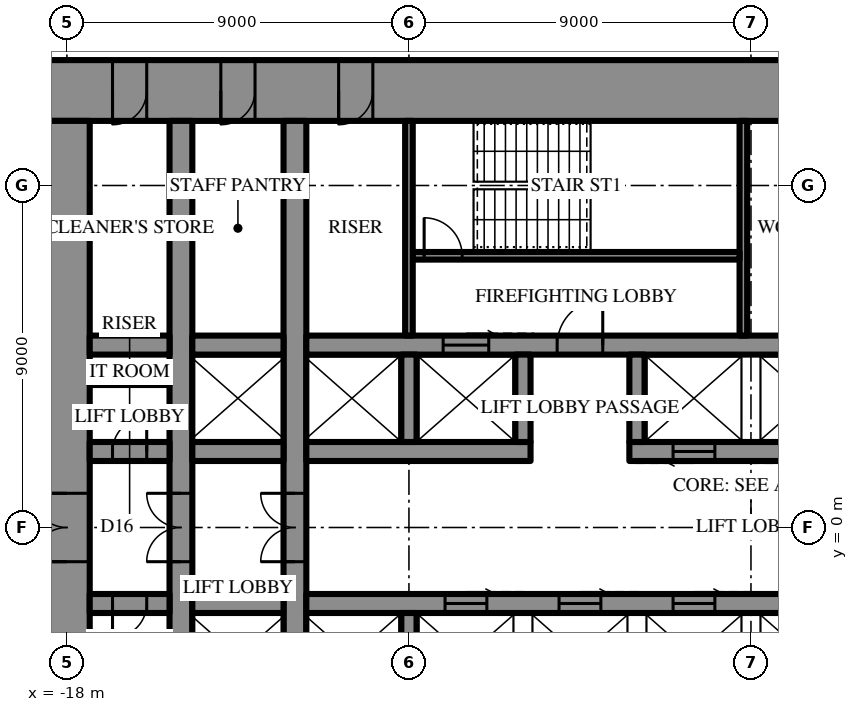
"""IFC4 building model, lengths in metres.
Left out: names, types, materials, properties, quantities, classifications, styles, units other than length and angle.
Written with IfcOpenShell. Run it as: python <this file> out.ifc"""

import sys

from ifc_helpers import new_model, si_unit, direction, frame, frame_2d, origin, place, context, subcontext, project, spatial, rectangle, extrude, element, fill, save


model = new_model("IFC4")
c1 = context("Model", 3, precision=1e-05, world=origin(), true_north=direction((0.0, 1.0)))
c2 = subcontext(c1, "Body", "Model", "MODEL_VIEW")
j1 = project(units=[si_unit("LENGTHUNIT", "METRE"), si_unit("PLANEANGLEUNIT", "RADIAN")], contexts=[c1])
p1 = place(None, origin())
s1 = spatial("IfcSite", under=j1, at=p1, CompositionType="ELEMENT")
p2 = place(p1, origin())
s2 = spatial("IfcBuilding", under=s1, at=p2, CompositionType="ELEMENT")
p3 = place(p2, frame((0.0, 0.0, 174.1)))
s3 = spatial("IfcBuildingStorey", under=s2, at=p3, CompositionType="ELEMENT", Elevation=174.1)
p4 = place(p3, frame((-18.6, 11.5, 0.0), z_axis=(0.0, 0.0, 1.0), x_axis=(1.0, 0.0, 0.0)))
e1 = element("IfcWall", 1, at=p4, inside=s3, PredefinedType="SHEAR", context=c2, shape_type="SweptSolid", body=[
    extrude(rectangle(XDim=37.2, YDim=1.6, at=frame_2d((18.6, 0.0))), origin(), (0.0, 0.0, 1.0), 4.2),
])
p5 = place(p4, frame((19.45, 0.0, 0.0)))
e2 = element("IfcOpeningElement", 2, at=p5, cuts=e1, PredefinedType="OPENING", context=c2, shape_type="SweptSolid", body=[
    extrude(rectangle(XDim=0.9, YDim=2.2, at=frame_2d((0.45, 1.1))), frame((0.0, 0.81, 0.0), z_axis=(0.0, -1.0, 0.0), x_axis=(1.0, 0.0, 0.0)), (0.0, 0.0, 1.0), 1.62),
])
p6 = place(p4, frame((22.45, 0.0, 0.0)))
e3 = element("IfcOpeningElement", 3, at=p6, cuts=e1, PredefinedType="OPENING", context=c2, shape_type="SweptSolid", body=[
    extrude(rectangle(XDim=0.9, YDim=2.2, at=frame_2d((0.45, 1.1))), frame((0.0, 0.81, 0.0), z_axis=(0.0, -1.0, 0.0), x_axis=(1.0, 0.0, 0.0)), (0.0, 0.0, 1.0), 1.62),
])
p7 = place(p4, frame((25.5, 0.0, 0.0)))
e4 = element("IfcOpeningElement", 4, at=p7, cuts=e1, PredefinedType="OPENING", context=c2, shape_type="SweptSolid", body=[
    extrude(rectangle(XDim=1.0, YDim=2.2, at=frame_2d((0.5, 1.1))), frame((0.0, 0.81, 0.0), z_axis=(0.0, -1.0, 0.0), x_axis=(1.0, 0.0, 0.0)), (0.0, 0.0, 1.0), 1.62),
])
p8 = place(p4, frame((1.8, 0.0, 0.0)))
e5 = element("IfcOpeningElement", 5, at=p8, cuts=e1, PredefinedType="OPENING", context=c2, shape_type="SweptSolid", body=[
    extrude(rectangle(XDim=0.9, YDim=2.2, at=frame_2d((0.45, 1.1))), frame((0.0, 0.81, 0.0), z_axis=(0.0, -1.0, 0.0), x_axis=(1.0, 0.0, 0.0)), (0.0, 0.0, 1.0), 1.62),
])
p9 = place(p4, frame((4.65, 0.0, 0.0)))
e6 = element("IfcOpeningElement", 6, at=p9, cuts=e1, PredefinedType="OPENING", context=c2, shape_type="SweptSolid", body=[
    extrude(rectangle(XDim=0.9, YDim=2.2, at=frame_2d((0.45, 1.1))), frame((0.0, 0.81, 0.0), z_axis=(0.0, -1.0, 0.0), x_axis=(1.0, 0.0, 0.0)), (0.0, 0.0, 1.0), 1.62),
])
p10 = place(p4, frame((7.75, 0.0, 0.0)))
e7 = element("IfcOpeningElement", 7, at=p10, cuts=e1, PredefinedType="OPENING", context=c2, shape_type="SweptSolid", body=[
    extrude(rectangle(XDim=0.9, YDim=2.2, at=frame_2d((0.45, 1.1))), frame((0.0, 0.81, 0.0), z_axis=(0.0, -1.0, 0.0), x_axis=(1.0, 0.0, 0.0)), (0.0, 0.0, 1.0), 1.62),
])
p11 = place(p4, frame((28.55, 0.0, 0.0)))
e8 = element("IfcOpeningElement", 8, at=p11, cuts=e1, PredefinedType="OPENING", context=c2, shape_type="SweptSolid", body=[
    extrude(rectangle(XDim=0.9, YDim=2.2, at=frame_2d((0.45, 1.1))), frame((0.0, 0.81, 0.0), z_axis=(0.0, -1.0, 0.0), x_axis=(1.0, 0.0, 0.0)), (0.0, 0.0, 1.0), 1.62),
])
p12 = place(p4, frame((31.65, 0.0, 0.0)))
e9 = element("IfcOpeningElement", 9, at=p12, cuts=e1, PredefinedType="OPENING", context=c2, shape_type="SweptSolid", body=[
    extrude(rectangle(XDim=0.9, YDim=2.2, at=frame_2d((0.45, 1.1))), frame((0.0, 0.81, 0.0), z_axis=(0.0, -1.0, 0.0), x_axis=(1.0, 0.0, 0.0)), (0.0, 0.0, 1.0), 1.62),
])
p13 = place(p4, frame((34.5, 0.0, 0.0)))
e10 = element("IfcOpeningElement", 10, at=p13, cuts=e1, PredefinedType="OPENING", context=c2, shape_type="SweptSolid", body=[
    extrude(rectangle(XDim=0.9, YDim=2.2, at=frame_2d((0.45, 1.1))), frame((0.0, 0.81, 0.0), z_axis=(0.0, -1.0, 0.0), x_axis=(1.0, 0.0, 0.0)), (0.0, 0.0, 1.0), 1.62),
])
p14 = place(p3, frame((-18.0, 10.7, 0.0), z_axis=(0.0, 0.0, 1.0), x_axis=(0.0, -1.0, 0.0)))
e11 = element("IfcWall", 11, at=p14, inside=s3, PredefinedType="SHEAR", context=c2, shape_type="SweptSolid", body=[
    extrude(rectangle(XDim=21.4, YDim=1.2, at=frame_2d((10.7, 0.0))), origin(), (0.0, 0.0, 1.0), 4.2),
])
p15 = place(p14, frame((9.8, 0.0, 0.0)))
e12 = element("IfcOpeningElement", 12, at=p15, cuts=e11, PredefinedType="OPENING", context=c2, shape_type="SweptSolid", body=[
    extrude(rectangle(XDim=1.8, YDim=2.4, at=frame_2d((0.9, 1.2))), frame((0.0, 0.61, 0.0), z_axis=(0.0, -1.0, 0.0), x_axis=(1.0, 0.0, 0.0)), (0.0, 0.0, 1.0), 1.22),
])
p16 = place(p3, frame((-12.0, -10.7, 0.0), z_axis=(0.0, 0.0, 1.0), x_axis=(0.0, 1.0, 0.0)))
e13 = element("IfcWall", 13, at=p16, inside=s3, PredefinedType="SHEAR", context=c2, shape_type="SweptSolid", body=[
    extrude(rectangle(XDim=21.4, YDim=0.6, at=frame_2d((10.7, 0.0))), origin(), (0.0, 0.0, 1.0), 4.2),
])
p17 = place(p16, frame((9.8, 0.0, 0.0)))
e14 = element("IfcOpeningElement", 14, at=p17, cuts=e13, PredefinedType="OPENING", context=c2, shape_type="SweptSolid", body=[
    extrude(rectangle(XDim=1.8, YDim=2.4, at=frame_2d((0.9, 1.2))), frame((0.0, 0.31, 0.0), z_axis=(0.0, -1.0, 0.0), x_axis=(1.0, 0.0, 0.0)), (0.0, 0.0, 1.0), 0.62),
])
p18 = place(p3, frame((-15.0, -10.7, 0.0), z_axis=(0.0, 0.0, 1.0), x_axis=(0.0, 1.0, 0.0)))
e15 = element("IfcWall", 15, at=p18, inside=s3, PredefinedType="SHEAR", context=c2, shape_type="SweptSolid", body=[
    extrude(rectangle(XDim=21.4, YDim=0.6, at=frame_2d((10.7, 0.0))), origin(), (0.0, 0.0, 1.0), 4.2),
])
p19 = place(p18, frame((9.8, 0.0, 0.0)))
e16 = element("IfcOpeningElement", 16, at=p19, cuts=e15, PredefinedType="OPENING", context=c2, shape_type="SweptSolid", body=[
    extrude(rectangle(XDim=1.8, YDim=2.4, at=frame_2d((0.9, 1.2))), frame((0.0, 0.31, 0.0), z_axis=(0.0, -1.0, 0.0), x_axis=(1.0, 0.0, 0.0)), (0.0, 0.0, 1.0), 0.62),
])
p20 = place(p3, frame((-17.4, 2.0, 0.0), z_axis=(0.0, 0.0, 1.0), x_axis=(1.0, 0.0, 0.0)))
e17 = element("IfcWall", 17, at=p20, inside=s3, PredefinedType="SHEAR", context=c2, shape_type="SweptSolid", body=[
    extrude(rectangle(XDim=2.1, YDim=0.5, at=frame_2d((1.05, 0.0))), origin(), (0.0, 0.0, 1.0), 4.2),
])
p21 = place(p20, frame((0.6, 0.0, 0.0)))
e18 = element("IfcOpeningElement", 18, at=p21, cuts=e17, PredefinedType="OPENING", context=c2, shape_type="SweptSolid", body=[
    extrude(rectangle(XDim=0.9, YDim=2.2, at=frame_2d((0.45, 1.1))), frame((0.0, 0.26, 0.0), z_axis=(0.0, -1.0, 0.0), x_axis=(1.0, 0.0, 0.0)), (0.0, 0.0, 1.0), 0.52),
])
p22 = place(p3, frame((-14.7, 2.0, 0.0), z_axis=(0.0, 0.0, 1.0), x_axis=(1.0, 0.0, 0.0)))
e19 = element("IfcWall", 19, at=p22, inside=s3, PredefinedType="SHEAR", context=c2, shape_type="SweptSolid", body=[
    extrude(rectangle(XDim=2.4, YDim=0.5, at=frame_2d((1.2, 0.0))), origin(), (0.0, 0.0, 1.0), 4.2),
])
p23 = place(p3, frame((-11.7, 2.0, 0.0), z_axis=(0.0, 0.0, 1.0), x_axis=(1.0, 0.0, 0.0)))
e20 = element("IfcWall", 20, at=p23, inside=s3, PredefinedType="SHEAR", context=c2, shape_type="SweptSolid", body=[
    extrude(rectangle(XDim=5.9, YDim=0.5, at=frame_2d((2.95, 0.0))), origin(), (0.0, 0.0, 1.0), 4.2),
])
p24 = place(p3, frame((-3.2, 2.0, 0.0), z_axis=(0.0, 0.0, 1.0), x_axis=(1.0, 0.0, 0.0)))
e21 = element("IfcWall", 21, at=p24, inside=s3, PredefinedType="SHEAR", context=c2, shape_type="SweptSolid", body=[
    extrude(rectangle(XDim=14.9, YDim=0.5, at=frame_2d((7.45, 0.0))), origin(), (0.0, 0.0, 1.0), 4.2),
])
p25 = place(p24, frame((1.15, 0.0, 0.0)))
e22 = element("IfcOpeningElement", 22, at=p25, cuts=e21, PredefinedType="OPENING", context=c2, shape_type="SweptSolid", body=[
    extrude(rectangle(XDim=1.1, YDim=2.2, at=frame_2d((0.55, 1.1))), frame((0.0, 0.26, 0.0), z_axis=(0.0, -1.0, 0.0), x_axis=(1.0, 0.0, 0.0)), (0.0, 0.0, 1.0), 0.52),
])
p26 = place(p24, frame((4.15, 0.0, 0.0)))
e23 = element("IfcOpeningElement", 23, at=p26, cuts=e21, PredefinedType="OPENING", context=c2, shape_type="SweptSolid", body=[
    extrude(rectangle(XDim=1.1, YDim=2.2, at=frame_2d((0.55, 1.1))), frame((0.0, 0.26, 0.0), z_axis=(0.0, -1.0, 0.0), x_axis=(1.0, 0.0, 0.0)), (0.0, 0.0, 1.0), 0.52),
])
p27 = place(p24, frame((7.15, 0.0, 0.0)))
e24 = element("IfcOpeningElement", 24, at=p27, cuts=e21, PredefinedType="OPENING", context=c2, shape_type="SweptSolid", body=[
    extrude(rectangle(XDim=1.1, YDim=2.2, at=frame_2d((0.55, 1.1))), frame((0.0, 0.26, 0.0), z_axis=(0.0, -1.0, 0.0), x_axis=(1.0, 0.0, 0.0)), (0.0, 0.0, 1.0), 0.52),
])
p28 = place(p24, frame((10.15, 0.0, 0.0)))
e25 = element("IfcOpeningElement", 25, at=p28, cuts=e21, PredefinedType="OPENING", context=c2, shape_type="SweptSolid", body=[
    extrude(rectangle(XDim=1.1, YDim=2.2, at=frame_2d((0.55, 1.1))), frame((0.0, 0.26, 0.0), z_axis=(0.0, -1.0, 0.0), x_axis=(1.0, 0.0, 0.0)), (0.0, 0.0, 1.0), 0.52),
])
p29 = place(p3, frame((-17.4, 4.8, 0.0), z_axis=(0.0, 0.0, 1.0), x_axis=(1.0, 0.0, 0.0)))
e26 = element("IfcWall", 26, at=p29, inside=s3, PredefinedType="SHEAR", context=c2, shape_type="SweptSolid", body=[
    extrude(rectangle(XDim=2.1, YDim=0.5, at=frame_2d((1.05, 0.0))), origin(), (0.0, 0.0, 1.0), 4.2),
])
p30 = place(p3, frame((-14.7, 4.8, 0.0), z_axis=(0.0, 0.0, 1.0), x_axis=(1.0, 0.0, 0.0)))
e27 = element("IfcWall", 27, at=p30, inside=s3, PredefinedType="SHEAR", context=c2, shape_type="SweptSolid", body=[
    extrude(rectangle(XDim=2.4, YDim=0.5, at=frame_2d((1.2, 0.0))), origin(), (0.0, 0.0, 1.0), 4.2),
])
p31 = place(p3, frame((-11.7, 4.8, 0.0), z_axis=(0.0, 0.0, 1.0), x_axis=(1.0, 0.0, 0.0)))
e28 = element("IfcWall", 28, at=p31, inside=s3, PredefinedType="SHEAR", context=c2, shape_type="SweptSolid", body=[
    extrude(rectangle(XDim=23.4, YDim=0.5, at=frame_2d((11.7, 0.0))), origin(), (0.0, 0.0, 1.0), 4.2),
])
p32 = place(p31, frame((6.6, 0.0, 0.0)))
e29 = element("IfcOpeningElement", 29, at=p32, cuts=e28, PredefinedType="OPENING", context=c2, shape_type="SweptSolid", body=[
    extrude(rectangle(XDim=1.2, YDim=2.2, at=frame_2d((0.6, 1.1))), frame((0.0, 0.26, 0.0), z_axis=(0.0, -1.0, 0.0), x_axis=(1.0, 0.0, 0.0)), (0.0, 0.0, 1.0), 0.52),
])
p33 = place(p31, frame((3.6, 0.0, 0.0)))
e30 = element("IfcOpeningElement", 30, at=p33, cuts=e28, PredefinedType="OPENING", context=c2, shape_type="SweptSolid", body=[
    extrude(rectangle(XDim=1.2, YDim=2.2, at=frame_2d((0.6, 1.1))), frame((0.0, 0.26, 0.0), z_axis=(0.0, -1.0, 0.0), x_axis=(1.0, 0.0, 0.0)), (0.0, 0.0, 1.0), 0.52),
])
for number, where, z_axis, x_axis in (
    (31, (-9.0, 2.25, 0.0), (0.0, 0.0, 1.0), (0.0, 1.0, 0.0)),
    (32, (-6.0, 2.25, 0.0), (0.0, 0.0, 1.0), (0.0, 1.0, 0.0)),
    (33, (-3.0, 2.25, 0.0), (0.0, 0.0, 1.0), (0.0, 1.0, 0.0)),
):
    element("IfcWall", number, at=place(p3, frame(where, z_axis=z_axis, x_axis=x_axis)), inside=s3, PredefinedType="SHEAR", context=c2, shape_type="SweptSolid", body=[
        extrude(rectangle(XDim=2.3, YDim=0.4, at=frame_2d((1.15, 0.0))), origin(), (0.0, 0.0, 1.0), 4.2),
    ])
p34 = place(p3, frame((-0.2, 5.05, 0.0), z_axis=(0.0, 0.0, 1.0), x_axis=(0.0, 1.0, 0.0)))
e34 = element("IfcWall", 34, at=p34, inside=s3, PredefinedType="SHEAR", context=c2, shape_type="SweptSolid", body=[
    extrude(rectangle(XDim=5.65, YDim=0.2, at=frame_2d((2.825, 0.0))), origin(), (0.0, 0.0, 1.0), 4.2),
])
p35 = place(p3, frame((-8.9, 7.15, 0.0), z_axis=(0.0, 0.0, 1.0), x_axis=(1.0, 0.0, 0.0)))
e35 = element("IfcWall", 35, at=p35, inside=s3, PredefinedType="SHEAR", context=c2, shape_type="SweptSolid", body=[
    extrude(rectangle(XDim=8.6, YDim=0.2, at=frame_2d((4.3, 0.0))), origin(), (0.0, 0.0, 1.0), 4.2),
])
p36 = place(p35, frame((0.3, 0.0, 0.0)))
e36 = element("IfcOpeningElement", 36, at=p36, cuts=e35, PredefinedType="OPENING", context=c2, shape_type="SweptSolid", body=[
    extrude(rectangle(XDim=1.0, YDim=2.2, at=frame_2d((0.5, 1.1))), frame((0.0, 0.11, 0.0), z_axis=(0.0, -1.0, 0.0), x_axis=(1.0, 0.0, 0.0)), (0.0, 0.0, 1.0), 0.22),
])
p37 = place(p3, frame((3.2, -2.0, 0.0), z_axis=(0.0, 0.0, 1.0), x_axis=(-1.0, 0.0, 0.0)))
e37 = element("IfcWall", 37, at=p37, inside=s3, PredefinedType="SHEAR", context=c2, shape_type="SweptSolid", body=[
    extrude(rectangle(XDim=14.9, YDim=0.5, at=frame_2d((7.45, 0.0))), origin(), (0.0, 0.0, 1.0), 4.2),
])
p38 = place(p37, frame((1.15, 0.0, 0.0)))
e38 = element("IfcOpeningElement", 38, at=p38, cuts=e37, PredefinedType="OPENING", context=c2, shape_type="SweptSolid", body=[
    extrude(rectangle(XDim=1.1, YDim=2.2, at=frame_2d((0.55, 1.1))), frame((0.0, 0.26, 0.0), z_axis=(0.0, -1.0, 0.0), x_axis=(1.0, 0.0, 0.0)), (0.0, 0.0, 1.0), 0.52),
])
p39 = place(p37, frame((4.15, 0.0, 0.0)))
e39 = element("IfcOpeningElement", 39, at=p39, cuts=e37, PredefinedType="OPENING", context=c2, shape_type="SweptSolid", body=[
    extrude(rectangle(XDim=1.1, YDim=2.2, at=frame_2d((0.55, 1.1))), frame((0.0, 0.26, 0.0), z_axis=(0.0, -1.0, 0.0), x_axis=(1.0, 0.0, 0.0)), (0.0, 0.0, 1.0), 0.52),
])
p40 = place(p37, frame((7.15, 0.0, 0.0)))
e40 = element("IfcOpeningElement", 40, at=p40, cuts=e37, PredefinedType="OPENING", context=c2, shape_type="SweptSolid", body=[
    extrude(rectangle(XDim=1.1, YDim=2.2, at=frame_2d((0.55, 1.1))), frame((0.0, 0.26, 0.0), z_axis=(0.0, -1.0, 0.0), x_axis=(1.0, 0.0, 0.0)), (0.0, 0.0, 1.0), 0.52),
])
p41 = place(p37, frame((10.15, 0.0, 0.0)))
e41 = element("IfcOpeningElement", 41, at=p41, cuts=e37, PredefinedType="OPENING", context=c2, shape_type="SweptSolid", body=[
    extrude(rectangle(XDim=1.1, YDim=2.2, at=frame_2d((0.55, 1.1))), frame((0.0, 0.26, 0.0), z_axis=(0.0, -1.0, 0.0), x_axis=(1.0, 0.0, 0.0)), (0.0, 0.0, 1.0), 0.52),
])
p42 = place(p3, frame((-12.3, -2.0, 0.0), z_axis=(0.0, 0.0, 1.0), x_axis=(-1.0, 0.0, 0.0)))
e42 = element("IfcWall", 42, at=p42, inside=s3, PredefinedType="SHEAR", context=c2, shape_type="SweptSolid", body=[
    extrude(rectangle(XDim=2.4, YDim=0.5, at=frame_2d((1.2, 0.0))), origin(), (0.0, 0.0, 1.0), 4.2),
])
p43 = place(p3, frame((-15.3, -2.0, 0.0), z_axis=(0.0, 0.0, 1.0), x_axis=(-1.0, 0.0, 0.0)))
e43 = element("IfcWall", 43, at=p43, inside=s3, PredefinedType="SHEAR", context=c2, shape_type="SweptSolid", body=[
    extrude(rectangle(XDim=2.1, YDim=0.5, at=frame_2d((1.05, 0.0))), origin(), (0.0, 0.0, 1.0), 4.2),
])
p44 = place(p43, frame((0.6, 0.0, 0.0)))
e44 = element("IfcOpeningElement", 44, at=p44, cuts=e43, PredefinedType="OPENING", context=c2, shape_type="SweptSolid", body=[
    extrude(rectangle(XDim=0.9, YDim=2.2, at=frame_2d((0.45, 1.1))), frame((0.0, 0.26, 0.0), z_axis=(0.0, -1.0, 0.0), x_axis=(1.0, 0.0, 0.0)), (0.0, 0.0, 1.0), 0.52),
])
p45 = place(p3, frame((-9.0, -2.25, 0.0), z_axis=(0.0, 0.0, 1.0), x_axis=(0.0, -1.0, 0.0)))
e45 = element("IfcWall", 45, at=p45, inside=s3, PredefinedType="SHEAR", context=c2, shape_type="SweptSolid", body=[
    extrude(rectangle(XDim=2.3, YDim=0.4, at=frame_2d((1.15, 0.0))), origin(), (0.0, 0.0, 1.0), 4.2),
])
p46 = place(p3, frame((-9.0, 5.05, 0.0), z_axis=(0.0, 0.0, 1.0), x_axis=(0.0, 1.0, 0.0)))
e46 = element("IfcWall", 46, at=p46, inside=s3, PredefinedType="PARTITIONING", context=c2, shape_type="SweptSolid", body=[
    extrude(rectangle(XDim=5.65, YDim=0.2, at=frame_2d((2.825, 0.0))), origin(), (0.0, 0.0, 1.0), 4.0),
])
p47 = place(p3, frame((-17.4, 3.85, 0.0), z_axis=(0.0, 0.0, 1.0), x_axis=(1.0, 0.0, 0.0)))
e47 = element("IfcWall", 47, at=p47, inside=s3, PredefinedType="PARTITIONING", context=c2, shape_type="SweptSolid", body=[
    extrude(rectangle(XDim=2.1, YDim=0.2, at=frame_2d((1.05, 0.0))), origin(), (0.0, 0.0, 1.0), 4.0),
])
p48 = place(p15, frame((1.8, 0.0, 0.0), z_axis=(0.0, 0.0, 1.0), x_axis=(-1.0, 0.0, 0.0)))
e48 = element("IfcDoor", 48, at=p48, inside=s3, OperationType="DOUBLE_DOOR_SINGLE_SWING", PredefinedType="DOOR", context=c2, shape_type="SweptSolid", body=[
    extrude(rectangle(XDim=1.8, YDim=2.4, at=frame_2d((0.9, 1.2))), frame((0.0, 0.025, 0.0), z_axis=(0.0, -1.0, 0.0), x_axis=(1.0, 0.0, 0.0)), (0.0, 0.0, 1.0), 0.05),
])
fill(e12, e48)
p49 = place(p32, origin())
e49 = element("IfcDoor", 49, at=p49, inside=s3, OperationType="SINGLE_SWING_LEFT", PredefinedType="DOOR", context=c2, shape_type="SweptSolid", body=[
    extrude(rectangle(XDim=1.2, YDim=2.2, at=frame_2d((0.6, 1.1))), frame((0.0, 0.025, 0.0), z_axis=(0.0, -1.0, 0.0), x_axis=(1.0, 0.0, 0.0)), (0.0, 0.0, 1.0), 0.05),
])
fill(e29, e49)
p50 = place(p36, origin())
e50 = element("IfcDoor", 50, at=p50, inside=s3, OperationType="SINGLE_SWING_RIGHT", PredefinedType="DOOR", context=c2, shape_type="SweptSolid", body=[
    extrude(rectangle(XDim=1.0, YDim=2.2, at=frame_2d((0.5, 1.1))), frame((0.0, 0.025, 0.0), z_axis=(0.0, -1.0, 0.0), x_axis=(1.0, 0.0, 0.0)), (0.0, 0.0, 1.0), 0.05),
])
fill(e36, e50)
p51 = place(p8, frame((0.9, 0.0, 0.0), z_axis=(0.0, 0.0, 1.0), x_axis=(-1.0, 0.0, 0.0)))
e51 = element("IfcDoor", 51, at=p51, inside=s3, OperationType="SINGLE_SWING_LEFT", PredefinedType="DOOR", context=c2, shape_type="SweptSolid", body=[
    extrude(rectangle(XDim=0.9, YDim=2.2, at=frame_2d((0.45, 1.1))), frame((0.0, 0.025, 0.0), z_axis=(0.0, -1.0, 0.0), x_axis=(1.0, 0.0, 0.0)), (0.0, 0.0, 1.0), 0.05),
])
fill(e5, e51)
p52 = place(p9, frame((0.9, 0.0, 0.0), z_axis=(0.0, 0.0, 1.0), x_axis=(-1.0, 0.0, 0.0)))
e52 = element("IfcDoor", 52, at=p52, inside=s3, OperationType="SINGLE_SWING_LEFT", PredefinedType="DOOR", context=c2, shape_type="SweptSolid", body=[
    extrude(rectangle(XDim=0.9, YDim=2.2, at=frame_2d((0.45, 1.1))), frame((0.0, 0.025, 0.0), z_axis=(0.0, -1.0, 0.0), x_axis=(1.0, 0.0, 0.0)), (0.0, 0.0, 1.0), 0.05),
])
fill(e6, e52)
p53 = place(p10, frame((0.9, 0.0, 0.0), z_axis=(0.0, 0.0, 1.0), x_axis=(-1.0, 0.0, 0.0)))
e53 = element("IfcDoor", 53, at=p53, inside=s3, OperationType="SINGLE_SWING_LEFT", PredefinedType="DOOR", context=c2, shape_type="SweptSolid", body=[
    extrude(rectangle(XDim=0.9, YDim=2.2, at=frame_2d((0.45, 1.1))), frame((0.0, 0.025, 0.0), z_axis=(0.0, -1.0, 0.0), x_axis=(1.0, 0.0, 0.0)), (0.0, 0.0, 1.0), 0.05),
])
fill(e7, e53)
p54 = place(p21, origin())
e54 = element("IfcDoor", 54, at=p54, inside=s3, OperationType="SINGLE_SWING_LEFT", PredefinedType="DOOR", context=c2, shape_type="SweptSolid", body=[
    extrude(rectangle(XDim=0.9, YDim=2.2, at=frame_2d((0.45, 1.1))), frame((0.0, 0.025, 0.0), z_axis=(0.0, -1.0, 0.0), x_axis=(1.0, 0.0, 0.0)), (0.0, 0.0, 1.0), 0.05),
])
fill(e18, e54)
p55 = place(p44, origin())
e55 = element("IfcDoor", 55, at=p55, inside=s3, OperationType="SINGLE_SWING_LEFT", PredefinedType="DOOR", context=c2, shape_type="SweptSolid", body=[
    extrude(rectangle(XDim=0.9, YDim=2.2, at=frame_2d((0.45, 1.1))), frame((0.0, 0.025, 0.0), z_axis=(0.0, -1.0, 0.0), x_axis=(1.0, 0.0, 0.0)), (0.0, 0.0, 1.0), 0.05),
])
fill(e44, e55)
p56 = place(p17, origin())
e56 = element("IfcDoor", 56, at=p56, inside=s3, OperationType="DOUBLE_DOOR_SINGLE_SWING", PredefinedType="DOOR", context=c2, shape_type="SweptSolid", body=[
    extrude(rectangle(XDim=1.8, YDim=2.4, at=frame_2d((0.9, 1.2))), frame((0.0, 0.025, 0.0), z_axis=(0.0, -1.0, 0.0), x_axis=(1.0, 0.0, 0.0)), (0.0, 0.0, 1.0), 0.05),
])
fill(e14, e56)
p57 = place(p19, origin())
e57 = element("IfcDoor", 57, at=p57, inside=s3, OperationType="DOUBLE_DOOR_SINGLE_SWING", PredefinedType="DOOR", context=c2, shape_type="SweptSolid", body=[
    extrude(rectangle(XDim=1.8, YDim=2.4, at=frame_2d((0.9, 1.2))), frame((0.0, 0.025, 0.0), z_axis=(0.0, -1.0, 0.0), x_axis=(1.0, 0.0, 0.0)), (0.0, 0.0, 1.0), 0.05),
])
fill(e16, e57)
p58 = place(p33, origin())
e58 = element("IfcDoor", 58, at=p58, inside=s3, OperationType="SLIDING_TO_LEFT", PredefinedType="DOOR", context=c2, shape_type="SweptSolid", body=[
    extrude(rectangle(XDim=1.2, YDim=2.2, at=frame_2d((0.6, 1.1))), frame((0.0, 0.025, 0.0), z_axis=(0.0, -1.0, 0.0), x_axis=(1.0, 0.0, 0.0)), (0.0, 0.0, 1.0), 0.05),
])
fill(e30, e58)
p59 = place(p25, frame((1.1, 0.0, 0.0), z_axis=(0.0, 0.0, 1.0), x_axis=(-1.0, 0.0, 0.0)))
e59 = element("IfcDoor", 59, at=p59, inside=s3, OperationType="SLIDING_TO_LEFT", PredefinedType="DOOR", context=c2, shape_type="SweptSolid", body=[
    extrude(rectangle(XDim=1.1, YDim=2.2, at=frame_2d((0.55, 1.1))), frame((0.0, 0.025, 0.0), z_axis=(0.0, -1.0, 0.0), x_axis=(1.0, 0.0, 0.0)), (0.0, 0.0, 1.0), 0.05),
])
fill(e22, e59)
p60 = place(p39, frame((1.1, 0.0, 0.0), z_axis=(0.0, 0.0, 1.0), x_axis=(-1.0, 0.0, 0.0)))
e60 = element("IfcDoor", 60, at=p60, inside=s3, OperationType="SLIDING_TO_LEFT", PredefinedType="DOOR", context=c2, shape_type="SweptSolid", body=[
    extrude(rectangle(XDim=1.1, YDim=2.2, at=frame_2d((0.55, 1.1))), frame((0.0, 0.025, 0.0), z_axis=(0.0, -1.0, 0.0), x_axis=(1.0, 0.0, 0.0)), (0.0, 0.0, 1.0), 0.05),
])
fill(e39, e60)
p61 = place(p40, frame((1.1, 0.0, 0.0), z_axis=(0.0, 0.0, 1.0), x_axis=(-1.0, 0.0, 0.0)))
e61 = element("IfcDoor", 61, at=p61, inside=s3, OperationType="SLIDING_TO_LEFT", PredefinedType="DOOR", context=c2, shape_type="SweptSolid", body=[
    extrude(rectangle(XDim=1.1, YDim=2.2, at=frame_2d((0.55, 1.1))), frame((0.0, 0.025, 0.0), z_axis=(0.0, -1.0, 0.0), x_axis=(1.0, 0.0, 0.0)), (0.0, 0.0, 1.0), 0.05),
])
fill(e40, e61)
p62 = place(p41, frame((1.1, 0.0, 0.0), z_axis=(0.0, 0.0, 1.0), x_axis=(-1.0, 0.0, 0.0)))
e62 = element("IfcDoor", 62, at=p62, inside=s3, OperationType="SLIDING_TO_LEFT", PredefinedType="DOOR", context=c2, shape_type="SweptSolid", body=[
    extrude(rectangle(XDim=1.1, YDim=2.2, at=frame_2d((0.55, 1.1))), frame((0.0, 0.025, 0.0), z_axis=(0.0, -1.0, 0.0), x_axis=(1.0, 0.0, 0.0)), (0.0, 0.0, 1.0), 0.05),
])
fill(e41, e62)
save(model, sys.argv[1])
